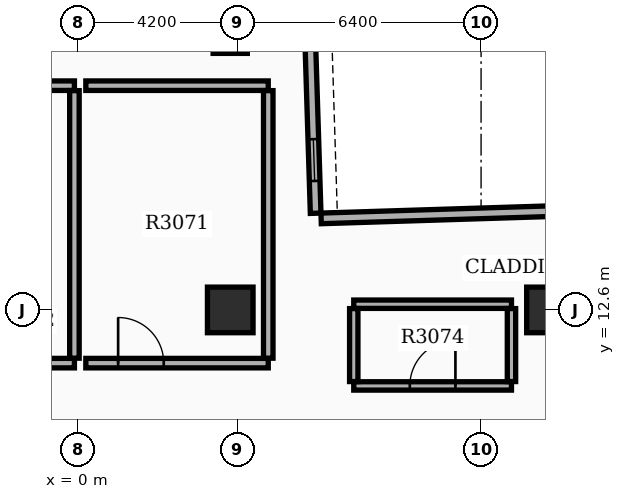
"""IFC4 building model, lengths in metres.
Left out: names, types, materials, properties, quantities, classifications, styles, units other than length and angle.
Written with IfcOpenShell. Run it as: python <this file> out.ifc"""

import sys

from ifc_helpers import new_model, si_unit, direction, frame, frame_2d, origin, origin_2d, place, context, subcontext, project, spatial, rectangle, extrude, element, fill, save


model = new_model("IFC4")
c1 = context("Model", 3, precision=1e-05, world=origin(), true_north=direction((0.0, 1.0)))
c2 = subcontext(c1, "Body", "Model", "MODEL_VIEW")
j1 = project(units=[si_unit("LENGTHUNIT", "METRE"), si_unit("PLANEANGLEUNIT", "RADIAN")], contexts=[c1])
p1 = place(None, origin())
s1 = spatial("IfcSite", under=j1, at=p1, CompositionType="ELEMENT")
p2 = place(p1, origin())
s2 = spatial("IfcBuilding", under=s1, at=p2, CompositionType="ELEMENT")
p3 = place(p2, frame((0.0, 0.0, 191.7)))
s3 = spatial("IfcBuildingStorey", under=s2, at=p3, CompositionType="ELEMENT", Elevation=191.7)
for number, where, z_axis, x_axis in (
    (1, (12.4, 12.6, 0.0), (0.0, 0.0, 1.0), (1.0, 0.0, 0.0)),
    (2, (4.0, 12.6, 0.0), (0.0, 0.0, 1.0), (1.0, 0.0, 0.0)),
):
    element("IfcColumn", number, at=place(p3, frame(where, z_axis=z_axis, x_axis=x_axis)), inside=s3, PredefinedType="COLUMN", context=c2, shape_type="SweptSolid", body=[
        extrude(rectangle(XDim=1.2, YDim=1.2, at=origin_2d()), origin(), (0.0, 0.0, 1.0), 5.1),
    ])
p4 = place(p3, frame((4.0, 19.8, 0.0), z_axis=(0.0, 0.0, 1.0), x_axis=(1.0, 0.0, 0.0)))
e3 = element("IfcColumn", 3, at=p4, inside=s3, PredefinedType="COLUMN", context=c2, shape_type="SweptSolid", body=[
    extrude(rectangle(XDim=0.9, YDim=0.9, at=origin_2d()), origin(), (0.0, 0.0, 1.0), 5.1),
])
p5 = place(p3, frame((6.247, 15.144, 0.0), z_axis=(0.0, 0.0, 1.0), x_axis=(-0.031398187845, 0.999506955354, 0.0)))
e4 = element("IfcWall", 4, at=p5, inside=s3, PredefinedType="STANDARD", context=c2, shape_type="SweptSolid", body=[
    extrude(rectangle(XDim=20.1, YDim=0.28, at=frame_2d((10.05, 0.0))), origin(), (0.0, 0.0, 1.0), 3.93),
])
p6 = place(p5, frame((0.85, 0.0, 0.95)))
e5 = element("IfcOpeningElement", 5, at=p6, cuts=e4, PredefinedType="OPENING", context=c2, shape_type="SweptSolid", body=[
    extrude(rectangle(XDim=1.1, YDim=1.2, at=frame_2d((0.55, 0.6))), frame((0.0, 0.15, 0.0), z_axis=(0.0, -1.0, 0.0), x_axis=(1.0, 0.0, 0.0)), (0.0, 0.0, 1.0), 0.3),
])
p7 = place(p3, frame((12.689, 15.206, 0.0), z_axis=(0.0, 0.0, 1.0), x_axis=(-0.999507262922, -0.031388395416, 0.0)))
e6 = element("IfcWall", 6, at=p7, inside=s3, PredefinedType="STANDARD", context=c2, shape_type="SweptSolid", body=[
    extrude(rectangle(XDim=6.3, YDim=0.28, at=frame_2d((3.15, 0.0))), origin(), (0.0, 0.0, 1.0), 3.93),
])
p8 = place(p3, frame((-5.0, 11.2, 0.0), z_axis=(0.0, 0.0, 1.0), x_axis=(1.0, 0.0, 0.0)))
e7 = element("IfcWall", 7, at=p8, inside=s3, PredefinedType="SOLIDWALL", context=c2, shape_type="SweptSolid", body=[
    extrude(rectangle(XDim=4.9, YDim=0.25, at=frame_2d((2.45, 0.0))), origin(), (0.0, 0.0, 1.0), 3.92),
])
p9 = place(p8, frame((2.8, 0.0, 0.0)))
e8 = element("IfcOpeningElement", 8, at=p9, cuts=e7, PredefinedType="OPENING", context=c2, shape_type="SweptSolid", body=[
    extrude(rectangle(XDim=1.2, YDim=2.15, at=frame_2d((0.6, 1.075))), frame((0.0, 0.135, 0.0), z_axis=(0.0, -1.0, 0.0), x_axis=(1.0, 0.0, 0.0)), (0.0, 0.0, 1.0), 0.27),
])
p10 = place(p3, frame((-5.0, 18.5, 0.0), z_axis=(0.0, 0.0, 1.0), x_axis=(1.0, 0.0, 0.0)))
e9 = element("IfcWall", 9, at=p10, inside=s3, PredefinedType="SOLIDWALL", context=c2, shape_type="SweptSolid", body=[
    extrude(rectangle(XDim=4.9, YDim=0.25, at=frame_2d((2.45, 0.0))), origin(), (0.0, 0.0, 1.0), 3.92),
])
p11 = place(p3, frame((-0.1, 11.33, 0.0), z_axis=(0.0, 0.0, 1.0), x_axis=(0.0, 1.0, 0.0)))
e10 = element("IfcWall", 10, at=p11, inside=s3, PredefinedType="SOLIDWALL", context=c2, shape_type="SweptSolid", body=[
    extrude(rectangle(XDim=7.04, YDim=0.25, at=frame_2d((3.52, 0.0))), origin(), (0.0, 0.0, 1.0), 3.92),
])
p12 = place(p3, frame((0.2, 11.2, 0.0), z_axis=(0.0, 0.0, 1.0), x_axis=(1.0, 0.0, 0.0)))
e11 = element("IfcWall", 11, at=p12, inside=s3, PredefinedType="SOLIDWALL", context=c2, shape_type="SweptSolid", body=[
    extrude(rectangle(XDim=4.8, YDim=0.25, at=frame_2d((2.4, 0.0))), origin(), (0.0, 0.0, 1.0), 3.92),
])
p13 = place(p12, frame((0.85, 0.0, 0.0)))
e12 = element("IfcOpeningElement", 12, at=p13, cuts=e11, PredefinedType="OPENING", context=c2, shape_type="SweptSolid", body=[
    extrude(rectangle(XDim=1.2, YDim=2.15, at=frame_2d((0.6, 1.075))), frame((0.0, 0.135, 0.0), z_axis=(0.0, -1.0, 0.0), x_axis=(1.0, 0.0, 0.0)), (0.0, 0.0, 1.0), 0.27),
])
p14 = place(p3, frame((0.2, 18.5, 0.0), z_axis=(0.0, 0.0, 1.0), x_axis=(1.0, 0.0, 0.0)))
e13 = element("IfcWall", 13, at=p14, inside=s3, PredefinedType="SOLIDWALL", context=c2, shape_type="SweptSolid", body=[
    extrude(rectangle(XDim=4.8, YDim=0.25, at=frame_2d((2.4, 0.0))), origin(), (0.0, 0.0, 1.0), 3.92),
])
p15 = place(p3, frame((5.0, 11.33, 0.0), z_axis=(0.0, 0.0, 1.0), x_axis=(0.0, 1.0, 0.0)))
e14 = element("IfcWall", 14, at=p15, inside=s3, PredefinedType="SOLIDWALL", context=c2, shape_type="SweptSolid", body=[
    extrude(rectangle(XDim=7.04, YDim=0.25, at=frame_2d((3.52, 0.0))), origin(), (0.0, 0.0, 1.0), 3.92),
])
p16 = place(p3, frame((7.25, 10.6, 0.0), z_axis=(0.0, 0.0, 1.0), x_axis=(1.0, 0.0, 0.0)))
e15 = element("IfcWall", 15, at=p16, inside=s3, PredefinedType="PARTITIONING", context=c2, shape_type="SweptSolid", body=[
    extrude(rectangle(XDim=4.15, YDim=0.22, at=frame_2d((2.075, 0.0))), origin(), (0.0, 0.0, 1.0), 3.92),
])
p17 = place(p16, frame((1.475, 0.0, 0.0)))
e16 = element("IfcOpeningElement", 16, at=p17, cuts=e15, PredefinedType="OPENING", context=c2, shape_type="SweptSolid", body=[
    extrude(rectangle(XDim=1.2, YDim=2.15, at=frame_2d((0.6, 1.075))), frame((0.0, 0.12, 0.0), z_axis=(0.0, -1.0, 0.0), x_axis=(1.0, 0.0, 0.0)), (0.0, 0.0, 1.0), 0.24),
])
p18 = place(p3, frame((7.25, 12.75, 0.0), z_axis=(0.0, 0.0, 1.0), x_axis=(1.0, 0.0, 0.0)))
e17 = element("IfcWall", 17, at=p18, inside=s3, PredefinedType="PARTITIONING", context=c2, shape_type="SweptSolid", body=[
    extrude(rectangle(XDim=4.15, YDim=0.22, at=frame_2d((2.075, 0.0))), origin(), (0.0, 0.0, 1.0), 3.92),
])
for number, where, z_axis, x_axis in (
    (18, (7.25, 10.715, 0.0), (0.0, 0.0, 1.0), (0.0, 1.0, 0.0)),
    (19, (11.4, 10.715, 0.0), (0.0, 0.0, 1.0), (0.0, 1.0, 0.0)),
):
    element("IfcWall", number, at=place(p3, frame(where, z_axis=z_axis, x_axis=x_axis)), inside=s3, PredefinedType="PARTITIONING", context=c2, shape_type="SweptSolid", body=[
        extrude(rectangle(XDim=1.92, YDim=0.22, at=frame_2d((0.96, 0.0))), origin(), (0.0, 0.0, 1.0), 3.92),
    ])
p19 = place(p6, origin())
e20 = element("IfcWindow", 20, at=p19, inside=s3, PartitioningType="SINGLE_PANEL", PredefinedType="WINDOW", context=c2, shape_type="SweptSolid", body=[
    extrude(rectangle(XDim=1.1, YDim=1.2, at=frame_2d((0.55, 0.6))), frame((0.0, 0.03, 0.0), z_axis=(0.0, -1.0, 0.0), x_axis=(1.0, 0.0, 0.0)), (0.0, 0.0, 1.0), 0.06),
])
fill(e5, e20)
p20 = place(p13, origin())
e21 = element("IfcDoor", 21, at=p20, inside=s3, OperationType="SINGLE_SWING_LEFT", PredefinedType="DOOR", context=c2, shape_type="SweptSolid", body=[
    extrude(rectangle(XDim=1.2, YDim=2.15, at=frame_2d((0.6, 1.075))), frame((0.0, 0.025, 0.0), z_axis=(0.0, -1.0, 0.0), x_axis=(1.0, 0.0, 0.0)), (0.0, 0.0, 1.0), 0.05),
])
fill(e12, e21)
p21 = place(p17, origin())
e22 = element("IfcDoor", 22, at=p21, inside=s3, OperationType="SINGLE_SWING_RIGHT", PredefinedType="DOOR", context=c2, shape_type="SweptSolid", body=[
    extrude(rectangle(XDim=1.2, YDim=2.15, at=frame_2d((0.6, 1.075))), frame((0.0, 0.025, 0.0), z_axis=(0.0, -1.0, 0.0), x_axis=(1.0, 0.0, 0.0)), (0.0, 0.0, 1.0), 0.05),
])
fill(e16, e22)
save(model, sys.argv[1])
